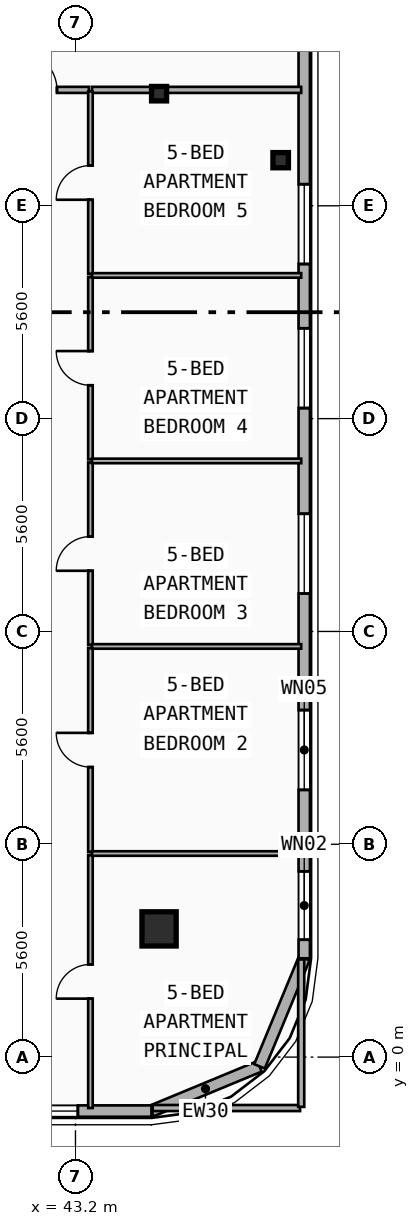
"""IFC4 building model, lengths in metres.
Left out: names, types, materials, properties, quantities, classifications, styles, units other than length and angle.
Written with IfcOpenShell. Run it as: python <this file> out.ifc"""

import sys

from ifc_helpers import new_model, si_unit, direction, frame, frame_2d, origin, origin_2d, place, context, subcontext, project, spatial, rectangle, i_section, extrude, element, fill, save


model = new_model("IFC4")
c1 = context("Model", 3, precision=1e-05, world=origin(), true_north=direction((0.0, 1.0)))
c2 = subcontext(c1, "Body", "Model", "MODEL_VIEW")
j1 = project(units=[si_unit("LENGTHUNIT", "METRE"), si_unit("PLANEANGLEUNIT", "RADIAN")], contexts=[c1])
p1 = place(None, origin())
s1 = spatial("IfcSite", under=j1, at=p1, CompositionType="ELEMENT")
p2 = place(p1, origin())
s2 = spatial("IfcBuilding", under=s1, at=p2, CompositionType="ELEMENT")
p3 = place(p2, frame((0.0, 0.0, 251.0)))
s3 = spatial("IfcBuildingStorey", under=s2, at=p3, CompositionType="ELEMENT", Elevation=251.0)
p4 = place(p3, frame((45.4, 25.35, 0.0), z_axis=(0.0, 0.0, 1.0), x_axis=(1.0, 0.0, 0.0)))
e1 = element("IfcColumn", 1, at=p4, inside=s3, PredefinedType="COLUMN", context=c2, shape_type="SweptSolid", body=[
    extrude(i_section(OverallWidth=0.395, OverallDepth=0.38, WebThickness=0.019, FlangeThickness=0.03, FilletRadius=0.015, at=origin_2d()), origin(), (0.0, 0.0, 1.0), 3.7),
])
p5 = place(p3, frame((45.4, 3.482, 0.0), z_axis=(0.0, -0.090227632116, 0.995921168769), x_axis=(1.0, 0.0, 0.0)))
e2 = element("IfcColumn", 2, at=p5, inside=s3, PredefinedType="COLUMN", context=c2, shape_type="SweptSolid", body=[
    extrude(rectangle(XDim=0.9, YDim=0.9, at=origin_2d()), origin(), (0.0, 0.0, 1.0), 3.715),
])
p6 = place(p3, frame((48.6, 23.6, 0.0), z_axis=(0.0, 0.0, 1.0), x_axis=(1.0, 0.0, 0.0)))
e3 = element("IfcColumn", 3, at=p6, inside=s3, PredefinedType="COLUMN", context=c2, shape_type="SweptSolid", body=[
    extrude(i_section(OverallWidth=0.408, OverallDepth=0.4, WebThickness=0.025, FlangeThickness=0.039, FilletRadius=0.015, at=origin_2d()), origin(), (0.0, 0.0, 1.0), 3.7),
])
p7 = place(p3, frame((48.042, -0.243, 0.0), z_axis=(0.0, 0.0, 1.0), x_axis=(-0.92389884758, -0.382636798336, 0.0)))
e4 = element("IfcWall", 4, at=p7, inside=s3, PredefinedType="SOLIDWALL", context=c2, shape_type="SweptSolid", body=[
    extrude(rectangle(XDim=3.077, YDim=0.3, at=frame_2d((1.538, 0.0))), origin(), (0.0, 0.0, 1.0), 3.42),
])
p8 = place(p3, frame((49.22, 2.6, 0.0), z_axis=(0.0, 0.0, 1.0), x_axis=(-0.382676475685, -0.923882414032, 0.0)))
e5 = element("IfcWall", 5, at=p8, inside=s3, PredefinedType="SOLIDWALL", context=c2, shape_type="SweptSolid", body=[
    extrude(rectangle(XDim=3.077, YDim=0.3, at=frame_2d((1.539, 0.0))), origin(), (0.0, 0.0, 1.0), 3.42),
])
p9 = place(p3, frame((49.22, 36.8, 0.0), z_axis=(0.0, 0.0, 1.0), x_axis=(0.0, -1.0, 0.0)))
e6 = element("IfcWall", 6, at=p9, inside=s3, PredefinedType="SOLIDWALL", context=c2, shape_type="SweptSolid", body=[
    extrude(rectangle(XDim=34.2, YDim=0.3, at=frame_2d((17.1, 0.0))), origin(), (0.0, 0.0, 1.0), 3.42),
])
p10 = place(p9, frame((31.912, 0.0, 0.8)))
e7 = element("IfcOpeningElement", 7, at=p10, cuts=e6, PredefinedType="OPENING", context=c2, shape_type="SweptSolid", body=[
    extrude(rectangle(XDim=1.8, YDim=1.8, at=frame_2d((0.9, 0.9))), frame((0.0, 0.16, 0.0), z_axis=(0.0, -1.0, 0.0), x_axis=(1.0, 0.0, 0.0)), (0.0, 0.0, 1.0), 0.32),
])
p11 = place(p9, frame((27.668, 0.0, 0.75)))
e8 = element("IfcOpeningElement", 8, at=p11, cuts=e6, PredefinedType="OPENING", context=c2, shape_type="SweptSolid", body=[
    extrude(rectangle(XDim=2.1, YDim=2.1, at=frame_2d((1.05, 1.05))), frame((0.0, 0.16, 0.0), z_axis=(0.0, -1.0, 0.0), x_axis=(1.0, 0.0, 0.0)), (0.0, 0.0, 1.0), 0.32),
])
p12 = place(p9, frame((22.503, 0.0, 0.75)))
e9 = element("IfcOpeningElement", 9, at=p12, cuts=e6, PredefinedType="OPENING", context=c2, shape_type="SweptSolid", body=[
    extrude(rectangle(XDim=2.1, YDim=2.1, at=frame_2d((1.05, 1.05))), frame((0.0, 0.16, 0.0), z_axis=(0.0, -1.0, 0.0), x_axis=(1.0, 0.0, 0.0)), (0.0, 0.0, 1.0), 0.32),
])
p13 = place(p9, frame((17.623, 0.0, 0.75)))
e10 = element("IfcOpeningElement", 10, at=p13, cuts=e6, PredefinedType="OPENING", context=c2, shape_type="SweptSolid", body=[
    extrude(rectangle(XDim=2.1, YDim=2.1, at=frame_2d((1.05, 1.05))), frame((0.0, 0.16, 0.0), z_axis=(0.0, -1.0, 0.0), x_axis=(1.0, 0.0, 0.0)), (0.0, 0.0, 1.0), 0.32),
])
p14 = place(p9, frame((13.832, 0.0, 0.75)))
e11 = element("IfcOpeningElement", 11, at=p14, cuts=e6, PredefinedType="OPENING", context=c2, shape_type="SweptSolid", body=[
    extrude(rectangle(XDim=2.1, YDim=2.1, at=frame_2d((1.05, 1.05))), frame((0.0, 0.16, 0.0), z_axis=(0.0, -1.0, 0.0), x_axis=(1.0, 0.0, 0.0)), (0.0, 0.0, 1.0), 0.32),
])
p15 = place(p3, frame((45.2, -1.42, 0.0), z_axis=(0.0, 0.0, 1.0), x_axis=(-1.0, 0.0, 0.0)))
e12 = element("IfcWall", 12, at=p15, inside=s3, PredefinedType="SOLIDWALL", context=c2, shape_type="SweptSolid", body=[
    extrude(rectangle(XDim=32.8, YDim=0.3, at=frame_2d((16.4, 0.0))), origin(), (0.0, 0.0, 1.0), 3.42),
])
p16 = place(p15, frame((29.071, 0.0, 0.75)))
e13 = element("IfcOpeningElement", 13, at=p16, cuts=e12, PredefinedType="OPENING", context=c2, shape_type="SweptSolid", body=[
    extrude(rectangle(XDim=2.1, YDim=2.1, at=frame_2d((1.05, 1.05))), frame((0.0, 0.16, 0.0), z_axis=(0.0, -1.0, 0.0), x_axis=(1.0, 0.0, 0.0)), (0.0, 0.0, 1.0), 0.32),
])
p17 = place(p15, frame((26.745, 0.0, 0.75)))
e14 = element("IfcOpeningElement", 14, at=p17, cuts=e12, PredefinedType="OPENING", context=c2, shape_type="SweptSolid", body=[
    extrude(rectangle(XDim=1.6, YDim=1.95, at=frame_2d((0.8, 0.975))), frame((0.0, 0.16, 0.0), z_axis=(0.0, -1.0, 0.0), x_axis=(1.0, 0.0, 0.0)), (0.0, 0.0, 1.0), 0.32),
])
p18 = place(p15, frame((18.105, 0.0, 0.75)))
e15 = element("IfcOpeningElement", 15, at=p18, cuts=e12, PredefinedType="OPENING", context=c2, shape_type="SweptSolid", body=[
    extrude(rectangle(XDim=2.1, YDim=2.1, at=frame_2d((1.05, 1.05))), frame((0.0, 0.16, 0.0), z_axis=(0.0, -1.0, 0.0), x_axis=(1.0, 0.0, 0.0)), (0.0, 0.0, 1.0), 0.32),
])
p19 = place(p15, frame((21.762, 0.0, 0.75)))
e16 = element("IfcOpeningElement", 16, at=p19, cuts=e12, PredefinedType="OPENING", context=c2, shape_type="SweptSolid", body=[
    extrude(rectangle(XDim=2.1, YDim=2.1, at=frame_2d((1.05, 1.05))), frame((0.0, 0.16, 0.0), z_axis=(0.0, -1.0, 0.0), x_axis=(1.0, 0.0, 0.0)), (0.0, 0.0, 1.0), 0.32),
])
p20 = place(p15, frame((11.364, 0.0, 0.75)))
e17 = element("IfcOpeningElement", 17, at=p20, cuts=e12, PredefinedType="OPENING", context=c2, shape_type="SweptSolid", body=[
    extrude(rectangle(XDim=2.1, YDim=2.1, at=frame_2d((1.05, 1.05))), frame((0.0, 0.16, 0.0), z_axis=(0.0, -1.0, 0.0), x_axis=(1.0, 0.0, 0.0)), (0.0, 0.0, 1.0), 0.32),
])
p21 = place(p15, frame((9.238, 0.0, 0.68)))
e18 = element("IfcOpeningElement", 18, at=p21, cuts=e12, PredefinedType="OPENING", context=c2, shape_type="SweptSolid", body=[
    extrude(rectangle(XDim=1.2, YDim=1.5, at=frame_2d((0.6, 0.75))), frame((0.0, 0.16, 0.0), z_axis=(0.0, -1.0, 0.0), x_axis=(1.0, 0.0, 0.0)), (0.0, 0.0, 1.0), 0.32),
])
p22 = place(p15, frame((14.669, 0.0, 0.75)))
e19 = element("IfcOpeningElement", 19, at=p22, cuts=e12, PredefinedType="OPENING", context=c2, shape_type="SweptSolid", body=[
    extrude(rectangle(XDim=2.1, YDim=2.1, at=frame_2d((1.05, 1.05))), frame((0.0, 0.16, 0.0), z_axis=(0.0, -1.0, 0.0), x_axis=(1.0, 0.0, 0.0)), (0.0, 0.0, 1.0), 0.32),
])
p23 = place(p15, frame((1.937, 0.0, 0.75)))
e20 = element("IfcOpeningElement", 20, at=p23, cuts=e12, PredefinedType="OPENING", context=c2, shape_type="SweptSolid", body=[
    extrude(rectangle(XDim=2.1, YDim=2.1, at=frame_2d((1.05, 1.05))), frame((0.0, 0.16, 0.0), z_axis=(0.0, -1.0, 0.0), x_axis=(1.0, 0.0, 0.0)), (0.0, 0.0, 1.0), 0.32),
])
p24 = place(p15, frame((4.709, 0.0, 0.8)))
e21 = element("IfcOpeningElement", 21, at=p24, cuts=e12, PredefinedType="OPENING", context=c2, shape_type="SweptSolid", body=[
    extrude(rectangle(XDim=1.8, YDim=1.8, at=frame_2d((0.9, 0.9))), frame((0.0, 0.16, 0.0), z_axis=(0.0, -1.0, 0.0), x_axis=(1.0, 0.0, 0.0)), (0.0, 0.0, 1.0), 0.32),
])
p25 = place(p3, frame((40.872, 25.45, 0.0), z_axis=(0.0, 0.0, 1.0), x_axis=(1.0, 0.0, 0.0)))
e22 = element("IfcWall", 22, at=p25, inside=s3, PredefinedType="PARTITIONING", context=c2, shape_type="SweptSolid", body=[
    extrude(rectangle(XDim=2.682, YDim=0.16, at=frame_2d((1.341, 0.0))), origin(), (0.0, 0.0, 1.0), 3.42),
])
p26 = place(p25, frame((0.841, 0.0, 0.0)))
e23 = element("IfcOpeningElement", 23, at=p26, cuts=e22, PredefinedType="OPENING", context=c2, shape_type="SweptSolid", body=[
    extrude(rectangle(XDim=1.0, YDim=2.15, at=frame_2d((0.5, 1.075))), frame((0.0, 0.09, 0.0), z_axis=(0.0, -1.0, 0.0), x_axis=(1.0, 0.0, 0.0)), (0.0, 0.0, 1.0), 0.18),
])
p27 = place(p3, frame((43.634, 25.45, 0.0), z_axis=(0.0, 0.0, 1.0), x_axis=(1.0, 0.0, 0.0)))
e24 = element("IfcWall", 24, at=p27, inside=s3, PredefinedType="PARTITIONING", context=c2, shape_type="SweptSolid", body=[
    extrude(rectangle(XDim=5.506, YDim=0.16, at=frame_2d((2.753, 0.0))), origin(), (0.0, 0.0, 1.0), 2.7),
])
p28 = place(p3, frame((43.594, -1.34, 0.0), z_axis=(0.0, 0.0, 1.0), x_axis=(0.0, 1.0, 0.0)))
e25 = element("IfcWall", 25, at=p28, inside=s3, PredefinedType="PARTITIONING", context=c2, shape_type="SweptSolid", body=[
    extrude(rectangle(XDim=6.657, YDim=0.12, at=frame_2d((3.329, 0.0))), origin(), (0.0, 0.0, 1.0), 3.08),
])
p29 = place(p28, frame((2.878, 0.0, 0.0)))
e26 = element("IfcOpeningElement", 26, at=p29, cuts=e25, PredefinedType="OPENING", context=c2, shape_type="SweptSolid", body=[
    extrude(rectangle(XDim=0.9, YDim=2.1, at=frame_2d((0.45, 1.05))), frame((0.0, 0.07, 0.0), z_axis=(0.0, -1.0, 0.0), x_axis=(1.0, 0.0, 0.0)), (0.0, 0.0, 1.0), 0.14),
])
p30 = place(p3, frame((43.594, 5.397, 0.0), z_axis=(0.0, 0.0, 1.0), x_axis=(0.0, 1.0, 0.0)))
e27 = element("IfcWall", 27, at=p30, inside=s3, PredefinedType="PARTITIONING", context=c2, shape_type="SweptSolid", body=[
    extrude(rectangle(XDim=5.369, YDim=0.12, at=frame_2d((2.685, 0.0))), origin(), (0.0, 0.0, 1.0), 2.9),
])
p31 = place(p30, frame((2.235, 0.0, 0.0)))
e28 = element("IfcOpeningElement", 28, at=p31, cuts=e27, PredefinedType="OPENING", context=c2, shape_type="SweptSolid", body=[
    extrude(rectangle(XDim=0.9, YDim=2.1, at=frame_2d((0.45, 1.05))), frame((0.0, 0.07, 0.0), z_axis=(0.0, -1.0, 0.0), x_axis=(1.0, 0.0, 0.0)), (0.0, 0.0, 1.0), 0.14),
])
p32 = place(p3, frame((43.594, 10.846, 0.0), z_axis=(0.0, 0.0, 1.0), x_axis=(0.0, 1.0, 0.0)))
e29 = element("IfcWall", 29, at=p32, inside=s3, PredefinedType="PARTITIONING", context=c2, shape_type="SweptSolid", body=[
    extrude(rectangle(XDim=4.801, YDim=0.12, at=frame_2d((2.4, 0.0))), origin(), (0.0, 0.0, 1.0), 2.9),
])
p33 = place(p32, frame((1.95, 0.0, 0.0)))
e30 = element("IfcOpeningElement", 30, at=p33, cuts=e29, PredefinedType="OPENING", context=c2, shape_type="SweptSolid", body=[
    extrude(rectangle(XDim=0.9, YDim=2.1, at=frame_2d((0.45, 1.05))), frame((0.0, 0.07, 0.0), z_axis=(0.0, -1.0, 0.0), x_axis=(1.0, 0.0, 0.0)), (0.0, 0.0, 1.0), 0.14),
])
p34 = place(p3, frame((43.594, 15.727, 0.0), z_axis=(0.0, 0.0, 1.0), x_axis=(0.0, 1.0, 0.0)))
e31 = element("IfcWall", 31, at=p34, inside=s3, PredefinedType="PARTITIONING", context=c2, shape_type="SweptSolid", body=[
    extrude(rectangle(XDim=4.801, YDim=0.12, at=frame_2d((2.4, 0.0))), origin(), (0.0, 0.0, 1.0), 2.9),
])
p35 = place(p34, frame((1.95, 0.0, 0.0)))
e32 = element("IfcOpeningElement", 32, at=p35, cuts=e31, PredefinedType="OPENING", context=c2, shape_type="SweptSolid", body=[
    extrude(rectangle(XDim=0.9, YDim=2.1, at=frame_2d((0.45, 1.05))), frame((0.0, 0.07, 0.0), z_axis=(0.0, -1.0, 0.0), x_axis=(1.0, 0.0, 0.0)), (0.0, 0.0, 1.0), 0.14),
])
p36 = place(p3, frame((43.594, 20.608, 0.0), z_axis=(0.0, 0.0, 1.0), x_axis=(0.0, 1.0, 0.0)))
e33 = element("IfcWall", 33, at=p36, inside=s3, PredefinedType="PARTITIONING", context=c2, shape_type="SweptSolid", body=[
    extrude(rectangle(XDim=4.802, YDim=0.12, at=frame_2d((2.401, 0.0))), origin(), (0.0, 0.0, 1.0), 3.05),
])
p37 = place(p36, frame((1.951, 0.0, 0.0)))
e34 = element("IfcOpeningElement", 34, at=p37, cuts=e33, PredefinedType="OPENING", context=c2, shape_type="SweptSolid", body=[
    extrude(rectangle(XDim=0.9, YDim=2.1, at=frame_2d((0.45, 1.05))), frame((0.0, 0.07, 0.0), z_axis=(0.0, -1.0, 0.0), x_axis=(1.0, 0.0, 0.0)), (0.0, 0.0, 1.0), 0.14),
])
for number, where, z_axis, x_axis in (
    (35, (43.634, 5.357, 0.0), (0.0, 0.0, 1.0), (1.0, 0.0, 0.0)),
    (36, (43.634, 10.806, 0.0), (0.0, 0.0, 1.0), (1.0, 0.0, 0.0)),
    (37, (43.634, 15.687, 0.0), (0.0, 0.0, 1.0), (1.0, 0.0, 0.0)),
    (38, (43.634, 20.568, 0.0), (0.0, 0.0, 1.0), (1.0, 0.0, 0.0)),
):
    element("IfcWall", number, at=place(p3, frame(where, z_axis=z_axis, x_axis=x_axis)), inside=s3, PredefinedType="PARTITIONING", context=c2, shape_type="SweptSolid", body=[
        extrude(rectangle(XDim=5.506, YDim=0.12, at=frame_2d((2.753, 0.0))), origin(), (0.0, 0.0, 1.0), 2.7),
    ])
for number, where, z_axis, x_axis in (
    (39, (45.23, -1.34, 0.0), (0.0, 0.0, 1.0), (1.0, 0.0, 0.0)),
    (40, (49.14, -1.31, 0.0), (0.0, 0.0, 1.0), (0.0, 1.0, 0.0)),
):
    element("IfcWall", number, at=place(p3, frame(where, z_axis=z_axis, x_axis=x_axis)), inside=s3, PredefinedType="PARTITIONING", context=c2, shape_type="SweptSolid", body=[
        extrude(rectangle(XDim=3.88, YDim=0.16, at=frame_2d((1.94, 0.0))), origin(), (0.0, 0.0, 1.0), 3.42),
    ])
p38 = place(p10, origin())
e41 = element("IfcWindow", 41, at=p38, inside=s3, PartitioningType="SINGLE_PANEL", PredefinedType="WINDOW", context=c2, shape_type="SweptSolid", body=[
    extrude(rectangle(XDim=1.8, YDim=1.8, at=frame_2d((0.9, 0.9))), frame((0.0, 0.03, 0.0), z_axis=(0.0, -1.0, 0.0), x_axis=(1.0, 0.0, 0.0)), (0.0, 0.0, 1.0), 0.06),
])
fill(e7, e41)
p39 = place(p11, origin())
e42 = element("IfcWindow", 42, at=p39, inside=s3, PartitioningType="SINGLE_PANEL", PredefinedType="WINDOW", context=c2, shape_type="SweptSolid", body=[
    extrude(rectangle(XDim=2.1, YDim=2.1, at=frame_2d((1.05, 1.05))), frame((0.0, 0.03, 0.0), z_axis=(0.0, -1.0, 0.0), x_axis=(1.0, 0.0, 0.0)), (0.0, 0.0, 1.0), 0.06),
])
fill(e8, e42)
p40 = place(p12, origin())
e43 = element("IfcWindow", 43, at=p40, inside=s3, PartitioningType="SINGLE_PANEL", PredefinedType="WINDOW", context=c2, shape_type="SweptSolid", body=[
    extrude(rectangle(XDim=2.1, YDim=2.1, at=frame_2d((1.05, 1.05))), frame((0.0, 0.03, 0.0), z_axis=(0.0, -1.0, 0.0), x_axis=(1.0, 0.0, 0.0)), (0.0, 0.0, 1.0), 0.06),
])
fill(e9, e43)
p41 = place(p13, origin())
e44 = element("IfcWindow", 44, at=p41, inside=s3, PartitioningType="SINGLE_PANEL", PredefinedType="WINDOW", context=c2, shape_type="SweptSolid", body=[
    extrude(rectangle(XDim=2.1, YDim=2.1, at=frame_2d((1.05, 1.05))), frame((0.0, 0.03, 0.0), z_axis=(0.0, -1.0, 0.0), x_axis=(1.0, 0.0, 0.0)), (0.0, 0.0, 1.0), 0.06),
])
fill(e10, e44)
p42 = place(p14, origin())
e45 = element("IfcWindow", 45, at=p42, inside=s3, PartitioningType="SINGLE_PANEL", PredefinedType="WINDOW", context=c2, shape_type="SweptSolid", body=[
    extrude(rectangle(XDim=2.1, YDim=2.1, at=frame_2d((1.05, 1.05))), frame((0.0, 0.03, 0.0), z_axis=(0.0, -1.0, 0.0), x_axis=(1.0, 0.0, 0.0)), (0.0, 0.0, 1.0), 0.06),
])
fill(e11, e45)
p43 = place(p23, origin())
e46 = element("IfcWindow", 46, at=p43, inside=s3, PartitioningType="SINGLE_PANEL", PredefinedType="WINDOW", context=c2, shape_type="SweptSolid", body=[
    extrude(rectangle(XDim=2.1, YDim=2.1, at=frame_2d((1.05, 1.05))), frame((0.0, 0.03, 0.0), z_axis=(0.0, -1.0, 0.0), x_axis=(1.0, 0.0, 0.0)), (0.0, 0.0, 1.0), 0.06),
])
fill(e20, e46)
p44 = place(p26, origin())
e47 = element("IfcDoor", 47, at=p44, inside=s3, OperationType="SINGLE_SWING_LEFT", PredefinedType="DOOR", context=c2, shape_type="SweptSolid", body=[
    extrude(rectangle(XDim=1.0, YDim=2.15, at=frame_2d((0.5, 1.075))), frame((0.0, 0.025, 0.0), z_axis=(0.0, -1.0, 0.0), x_axis=(1.0, 0.0, 0.0)), (0.0, 0.0, 1.0), 0.05),
])
fill(e23, e47)
p45 = place(p29, origin())
e48 = element("IfcDoor", 48, at=p45, inside=s3, OperationType="SINGLE_SWING_LEFT", PredefinedType="DOOR", context=c2, shape_type="SweptSolid", body=[
    extrude(rectangle(XDim=0.9, YDim=2.1, at=frame_2d((0.45, 1.05))), frame((0.0, 0.025, 0.0), z_axis=(0.0, -1.0, 0.0), x_axis=(1.0, 0.0, 0.0)), (0.0, 0.0, 1.0), 0.05),
])
fill(e26, e48)
p46 = place(p31, origin())
e49 = element("IfcDoor", 49, at=p46, inside=s3, OperationType="SINGLE_SWING_RIGHT", PredefinedType="DOOR", context=c2, shape_type="SweptSolid", body=[
    extrude(rectangle(XDim=0.9, YDim=2.1, at=frame_2d((0.45, 1.05))), frame((0.0, 0.025, 0.0), z_axis=(0.0, -1.0, 0.0), x_axis=(1.0, 0.0, 0.0)), (0.0, 0.0, 1.0), 0.05),
])
fill(e28, e49)
p47 = place(p33, origin())
e50 = element("IfcDoor", 50, at=p47, inside=s3, OperationType="SINGLE_SWING_LEFT", PredefinedType="DOOR", context=c2, shape_type="SweptSolid", body=[
    extrude(rectangle(XDim=0.9, YDim=2.1, at=frame_2d((0.45, 1.05))), frame((0.0, 0.025, 0.0), z_axis=(0.0, -1.0, 0.0), x_axis=(1.0, 0.0, 0.0)), (0.0, 0.0, 1.0), 0.05),
])
fill(e30, e50)
p48 = place(p35, origin())
e51 = element("IfcDoor", 51, at=p48, inside=s3, OperationType="SINGLE_SWING_RIGHT", PredefinedType="DOOR", context=c2, shape_type="SweptSolid", body=[
    extrude(rectangle(XDim=0.9, YDim=2.1, at=frame_2d((0.45, 1.05))), frame((0.0, 0.025, 0.0), z_axis=(0.0, -1.0, 0.0), x_axis=(1.0, 0.0, 0.0)), (0.0, 0.0, 1.0), 0.05),
])
fill(e32, e51)
p49 = place(p37, origin())
e52 = element("IfcDoor", 52, at=p49, inside=s3, OperationType="SINGLE_SWING_LEFT", PredefinedType="DOOR", context=c2, shape_type="SweptSolid", body=[
    extrude(rectangle(XDim=0.9, YDim=2.1, at=frame_2d((0.45, 1.05))), frame((0.0, 0.025, 0.0), z_axis=(0.0, -1.0, 0.0), x_axis=(1.0, 0.0, 0.0)), (0.0, 0.0, 1.0), 0.05),
])
fill(e34, e52)
save(model, sys.argv[1])
